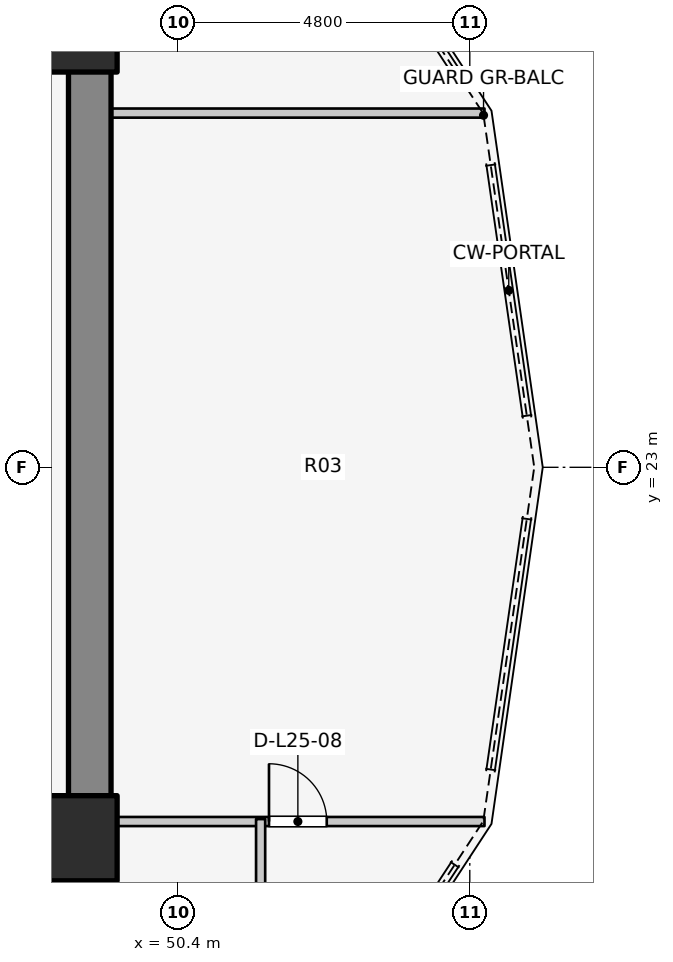
"""IFC4 building model, lengths in metres.
Left out: names, types, materials, properties, quantities, classifications, styles, units other than length and angle.
Written with IfcOpenShell. Run it as: python <this file> out.ifc"""

import sys

from ifc_helpers import new_model, si_unit, direction, frame, frame_2d, origin, origin_2d, place, context, subcontext, project, spatial, rectangle, extrude, element, fill, save


model = new_model("IFC4")
c1 = context("Model", 3, precision=1e-05, world=origin(), true_north=direction((0.0, 1.0)))
c2 = subcontext(c1, "Body", "Model", "MODEL_VIEW")
j1 = project(units=[si_unit("LENGTHUNIT", "METRE"), si_unit("PLANEANGLEUNIT", "RADIAN")], contexts=[c1])
p1 = place(None, origin())
s1 = spatial("IfcSite", under=j1, at=p1, CompositionType="ELEMENT")
p2 = place(p1, origin())
s2 = spatial("IfcBuilding", under=s1, at=p2, CompositionType="ELEMENT")
p3 = place(p2, frame((0.0, 0.0, 85.6)))
s3 = spatial("IfcBuildingStorey", under=s2, at=p3, CompositionType="ELEMENT", Elevation=85.6)
p4 = place(p3, frame((48.95, 17.05, 0.0), z_axis=(0.0, 0.0, 1.0), x_axis=(0.0, 1.0, 0.0)))
e1 = element("IfcWall", 1, at=p4, inside=s3, PredefinedType="SHEAR", context=c2, shape_type="SweptSolid", body=[
    extrude(rectangle(XDim=12.8, YDim=0.7, at=frame_2d((6.4, 0.0))), origin(), (0.0, 0.0, 1.0), 3.1),
])
for number, where, z_axis, x_axis in (
    (2, (48.7, 16.9, 0.0), (0.0, 0.0, 1.0), (1.0, 0.0, 0.0)),
    (3, (48.7, 30.2, 0.0), (0.0, 0.0, 1.0), (1.0, 0.0, 0.0)),
):
    element("IfcColumn", number, at=place(p3, frame(where, z_axis=z_axis, x_axis=x_axis)), inside=s3, PredefinedType="COLUMN", context=c2, shape_type="SweptSolid", body=[
        extrude(rectangle(XDim=1.4, YDim=1.4, at=origin_2d()), origin(), (0.0, 0.0, 1.0), 3.1),
    ])
p5 = place(p3, frame((48.95, 17.175, 0.0), z_axis=(0.0, 0.0, 1.0), x_axis=(1.0, 0.0, 0.0)))
e4 = element("IfcWall", 4, at=p5, inside=s3, PredefinedType="PARTITIONING", context=c2, shape_type="SweptSolid", body=[
    extrude(rectangle(XDim=6.492, YDim=0.15, at=frame_2d((3.246, 0.0))), origin(), (0.0, 0.0, 1.0), 2.855),
])
p6 = place(p5, frame((2.948, 0.0, 0.0)))
e5 = element("IfcOpeningElement", 5, at=p6, cuts=e4, PredefinedType="OPENING", context=c2, shape_type="SweptSolid", body=[
    extrude(rectangle(XDim=0.95, YDim=2.1, at=frame_2d((0.475, 1.05))), frame((0.0, 0.085, 0.0), z_axis=(0.0, -1.0, 0.0), x_axis=(1.0, 0.0, 0.0)), (0.0, 0.0, 1.0), 0.17),
])
p7 = place(p3, frame((48.95, 28.825, 0.0), z_axis=(0.0, 0.0, 1.0), x_axis=(1.0, 0.0, 0.0)))
e6 = element("IfcWall", 6, at=p7, inside=s3, PredefinedType="PARTITIONING", context=c2, shape_type="SweptSolid", body=[
    extrude(rectangle(XDim=6.492, YDim=0.15, at=frame_2d((3.246, 0.0))), origin(), (0.0, 0.0, 1.0), 2.855),
])
p8 = place(p3, frame((48.95, 29.8, 0.0), z_axis=(0.0, 0.0, 1.0), x_axis=(0.0, 1.0, 0.0)))
e7 = element("IfcWall", 7, at=p8, inside=s3, PredefinedType="PARTITIONING", context=c2, shape_type="SweptSolid", body=[
    extrude(rectangle(XDim=1.29, YDim=0.15, at=frame_2d((0.645, 0.0))), origin(), (0.0, 0.0, 1.0), 2.142),
])
p9 = place(p3, frame((51.76, 13.68, 0.0), z_axis=(0.0, 0.0, 1.0), x_axis=(0.0, 1.0, 0.0)))
e8 = element("IfcWall", 8, at=p9, inside=s3, PredefinedType="PARTITIONING", context=c2, shape_type="SweptSolid", body=[
    extrude(rectangle(XDim=3.535, YDim=0.15, at=frame_2d((1.768, 0.0))), origin(), (0.0, 0.0, 1.0), 2.855),
])
p10 = place(p6, origin())
e9 = element("IfcDoor", 9, at=p10, inside=s3, OperationType="SINGLE_SWING_LEFT", PredefinedType="DOOR", context=c2, shape_type="SweptSolid", body=[
    extrude(rectangle(XDim=0.95, YDim=2.1, at=frame_2d((0.475, 1.05))), frame((0.0, 0.025, 0.0), z_axis=(0.0, -1.0, 0.0), x_axis=(1.0, 0.0, 0.0)), (0.0, 0.0, 1.0), 0.05),
])
fill(e5, e9)
save(model, sys.argv[1])
